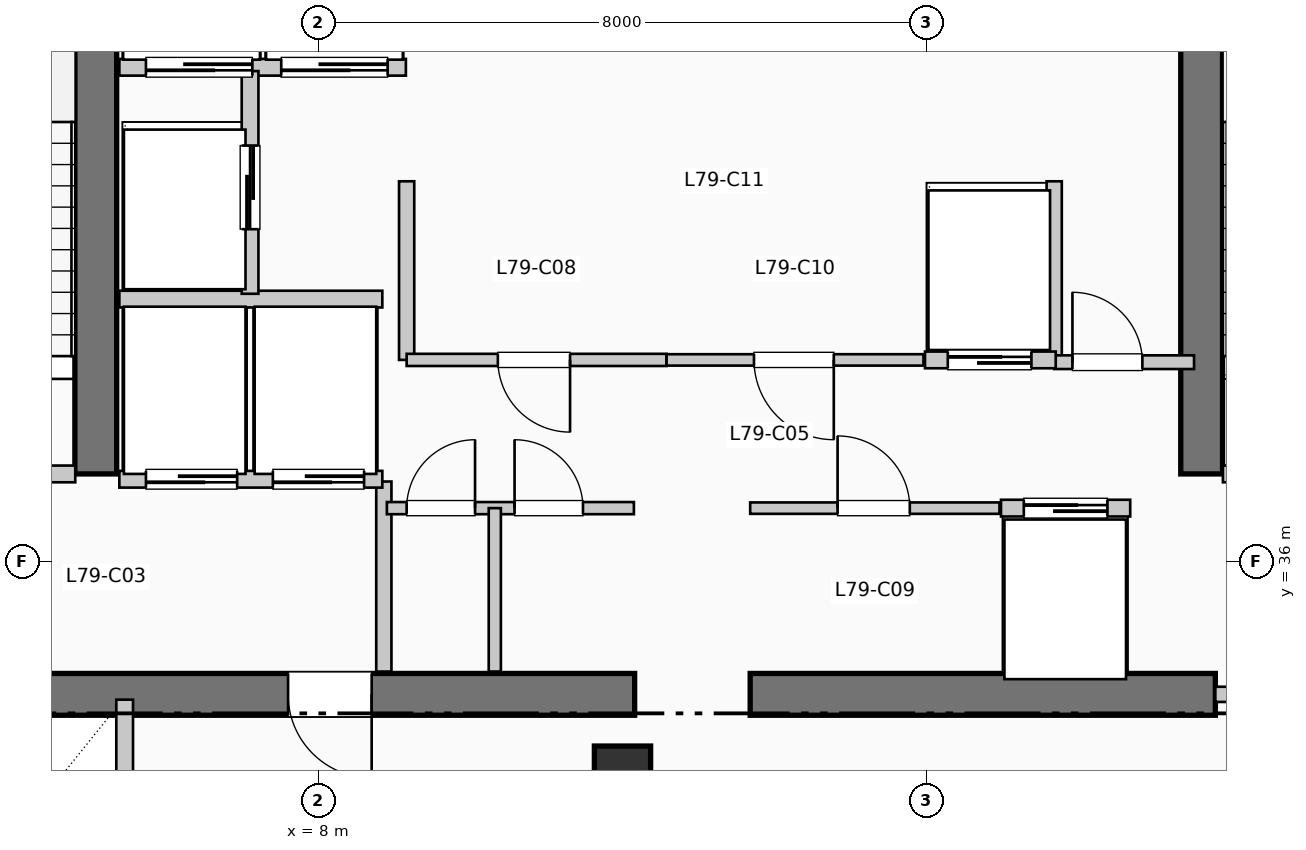
"""IFC4 building model, lengths in metres.
Left out: names, types, materials, properties, quantities, classifications, styles, units other than length and angle.
Written with IfcOpenShell. Run it as: python <this file> out.ifc"""

import sys

from ifc_helpers import new_model, si_unit, direction, frame, frame_2d, origin, origin_2d, place, context, subcontext, project, spatial, rectangle, extrude, element, fill, save


model = new_model("IFC4")
c1 = context("Model", 3, precision=1e-05, world=origin(), true_north=direction((0.0, 1.0)))
c2 = subcontext(c1, "Body", "Model", "MODEL_VIEW")
j1 = project(units=[si_unit("LENGTHUNIT", "METRE"), si_unit("PLANEANGLEUNIT", "RADIAN")], contexts=[c1])
p1 = place(None, origin())
s1 = spatial("IfcSite", under=j1, at=p1, CompositionType="ELEMENT")
p2 = place(p1, origin())
s2 = spatial("IfcBuilding", under=s1, at=p2, CompositionType="ELEMENT")
p3 = place(p2, frame((0.0, 0.0, 323.73)))
s3 = spatial("IfcBuildingStorey", under=s2, at=p3, CompositionType="ELEMENT", Elevation=323.73)
p4 = place(p3, frame((1.45, 34.25, 0.0), z_axis=(0.0, 0.0, 1.0), x_axis=(1.0, 0.0, 0.0)))
e1 = element("IfcWall", 1, at=p4, inside=s3, PredefinedType="SHEAR", context=c2, shape_type="SweptSolid", body=[
    extrude(rectangle(XDim=10.71, YDim=0.55, at=frame_2d((5.355, 0.0))), origin(), (0.0, 0.0, 1.0), 3.96),
])
p5 = place(p4, frame((7.25, 0.0, 0.0), z_axis=(0.0, 0.0, 1.0), x_axis=(-1.0, 0.0, 0.0)))
e2 = element("IfcOpeningElement", 2, at=p5, cuts=e1, PredefinedType="OPENING", context=c2, shape_type="SweptSolid", body=[
    extrude(rectangle(XDim=1.1, YDim=2.15, at=frame_2d((0.55, 1.075))), frame((0.0, 0.285, 0.0), z_axis=(0.0, -1.0, 0.0), x_axis=(1.0, 0.0, 0.0)), (0.0, 0.0, 1.0), 0.57),
])
p6 = place(p3, frame((13.68, 34.25, 0.0), z_axis=(0.0, 0.0, 1.0), x_axis=(1.0, 0.0, 0.0)))
e3 = element("IfcWall", 3, at=p6, inside=s3, PredefinedType="SHEAR", context=c2, shape_type="SweptSolid", body=[
    extrude(rectangle(XDim=6.12, YDim=0.55, at=frame_2d((3.06, 0.0))), origin(), (0.0, 0.0, 1.0), 3.96),
])
for number, where, z_axis, x_axis in (
    (4, (5.07, 37.15, 0.0), (0.0, 0.0, 1.0), (0.0, 1.0, 0.0)),
    (5, (19.62, 37.15, 0.0), (0.0, 0.0, 1.0), (0.0, 1.0, 0.0)),
):
    element("IfcWall", number, at=place(p3, frame(where, z_axis=z_axis, x_axis=x_axis)), inside=s3, PredefinedType="SHEAR", context=c2, shape_type="SweptSolid", body=[
        extrude(rectangle(XDim=7.89, YDim=0.55, at=frame_2d((3.945, 0.0))), origin(), (0.0, 0.0, 1.0), 3.96),
    ])
p7 = place(p3, frame((12.0, 33.2, 0.0), z_axis=(0.0, 0.0, 1.0), x_axis=(1.0, 0.0, 0.0)))
e6 = element("IfcColumn", 6, at=p7, inside=s3, PredefinedType="COLUMN", context=c2, shape_type="SweptSolid", body=[
    extrude(rectangle(XDim=0.74, YDim=0.74, at=origin_2d()), origin(), (0.0, 0.0, 1.0), 3.96),
])
p8 = place(p3, frame((1.65, 37.15, 0.0), z_axis=(0.0, 0.0, 1.0), x_axis=(1.0, 0.0, 0.0)))
e7 = element("IfcWall", 7, at=p8, inside=s3, PredefinedType="PARTITIONING", context=c2, shape_type="SweptSolid", body=[
    extrude(rectangle(XDim=3.15, YDim=0.22, at=frame_2d((1.575, 0.0))), origin(), (0.0, 0.0, 1.0), 3.74),
])
p9 = place(p8, frame((2.05, 0.0, 0.0), z_axis=(0.0, 0.0, 1.0), x_axis=(-1.0, 0.0, 0.0)))
e8 = element("IfcOpeningElement", 8, at=p9, cuts=e7, PredefinedType="OPENING", context=c2, shape_type="SweptSolid", body=[
    extrude(rectangle(XDim=1.05, YDim=2.15, at=frame_2d((0.525, 1.075))), frame((0.0, 0.12, 0.0), z_axis=(0.0, -1.0, 0.0), x_axis=(1.0, 0.0, 0.0)), (0.0, 0.0, 1.0), 0.24),
])
p10 = place(p3, frame((8.86, 34.55, 0.0), z_axis=(0.0, 0.0, 1.0), x_axis=(0.0, 1.0, 0.0)))
e9 = element("IfcWall", 9, at=p10, inside=s3, PredefinedType="PARTITIONING", context=c2, shape_type="SweptSolid", body=[
    extrude(rectangle(XDim=2.5, YDim=0.2, at=frame_2d((1.25, 0.0))), origin(), (0.0, 0.0, 1.0), 3.74),
])
p11 = place(p3, frame((19.9, 37.15, 0.0), z_axis=(0.0, 0.0, 1.0), x_axis=(1.0, 0.0, 0.0)))
e10 = element("IfcWall", 10, at=p11, inside=s3, PredefinedType="PARTITIONING", context=c2, shape_type="SweptSolid", body=[
    extrude(rectangle(XDim=3.15, YDim=0.22, at=frame_2d((1.575, 0.0))), origin(), (0.0, 0.0, 1.0), 3.74),
])
p12 = place(p11, frame((2.05, 0.0, 0.0), z_axis=(0.0, 0.0, 1.0), x_axis=(-1.0, 0.0, 0.0)))
e11 = element("IfcOpeningElement", 11, at=p12, cuts=e10, PredefinedType="OPENING", context=c2, shape_type="SweptSolid", body=[
    extrude(rectangle(XDim=1.05, YDim=2.15, at=frame_2d((0.525, 1.075))), frame((0.0, 0.12, 0.0), z_axis=(0.0, -1.0, 0.0), x_axis=(1.0, 0.0, 0.0)), (0.0, 0.0, 1.0), 0.24),
])
p13 = place(p3, frame((19.8, 34.25, 0.0), z_axis=(0.0, 0.0, 1.0), x_axis=(1.0, 0.0, 0.0)))
e12 = element("IfcWall", 12, at=p13, inside=s3, PredefinedType="PARTITIONING", context=c2, shape_type="SweptSolid", body=[
    extrude(rectangle(XDim=3.25, YDim=0.2, at=frame_2d((1.625, 0.0))), origin(), (0.0, 0.0, 1.0), 3.74),
])
p14 = place(p13, frame((2.15, 0.0, 0.0), z_axis=(0.0, 0.0, 1.0), x_axis=(-1.0, 0.0, 0.0)))
e13 = element("IfcOpeningElement", 13, at=p14, cuts=e12, PredefinedType="OPENING", context=c2, shape_type="SweptSolid", body=[
    extrude(rectangle(XDim=1.1, YDim=2.15, at=frame_2d((0.55, 1.075))), frame((0.0, 0.11, 0.0), z_axis=(0.0, -1.0, 0.0), x_axis=(1.0, 0.0, 0.0)), (0.0, 0.0, 1.0), 0.22),
])
p15 = place(p3, frame((5.38, 37.08, 0.0), z_axis=(0.0, 0.0, 1.0), x_axis=(1.0, 0.0, 0.0)))
e14 = element("IfcWall", 14, at=p15, inside=s3, PredefinedType="PARTITIONING", context=c2, shape_type="SweptSolid", body=[
    extrude(rectangle(XDim=3.46, YDim=0.22, at=frame_2d((1.73, 0.0))), origin(), (0.0, 0.0, 1.0), 3.74),
])
p16 = place(p15, frame((1.55, 0.0, 0.0), z_axis=(0.0, 0.0, 1.0), x_axis=(-1.0, 0.0, 0.0)))
e15 = element("IfcOpeningElement", 15, at=p16, cuts=e14, PredefinedType="OPENING", context=c2, shape_type="SweptSolid", body=[
    extrude(rectangle(XDim=1.2, YDim=2.2, at=frame_2d((0.6, 1.1))), frame((0.0, 0.12, 0.0), z_axis=(0.0, -1.0, 0.0), x_axis=(1.0, 0.0, 0.0)), (0.0, 0.0, 1.0), 0.24),
])
p17 = place(p15, frame((3.22, 0.0, 0.0), z_axis=(0.0, 0.0, 1.0), x_axis=(-1.0, 0.0, 0.0)))
e16 = element("IfcOpeningElement", 16, at=p17, cuts=e14, PredefinedType="OPENING", context=c2, shape_type="SweptSolid", body=[
    extrude(rectangle(XDim=1.2, YDim=2.2, at=frame_2d((0.6, 1.1))), frame((0.0, 0.12, 0.0), z_axis=(0.0, -1.0, 0.0), x_axis=(1.0, 0.0, 0.0)), (0.0, 0.0, 1.0), 0.24),
])
p18 = place(p3, frame((5.38, 39.45, 0.0), z_axis=(0.0, 0.0, 1.0), x_axis=(1.0, 0.0, 0.0)))
e17 = element("IfcWall", 17, at=p18, inside=s3, PredefinedType="PARTITIONING", context=c2, shape_type="SweptSolid", body=[
    extrude(rectangle(XDim=3.46, YDim=0.22, at=frame_2d((1.73, 0.0))), origin(), (0.0, 0.0, 1.0), 3.74),
])
p19 = place(p3, frame((5.38, 42.5, 0.0), z_axis=(0.0, 0.0, 1.0), x_axis=(1.0, 0.0, 0.0)))
e18 = element("IfcWall", 18, at=p19, inside=s3, PredefinedType="PARTITIONING", context=c2, shape_type="SweptSolid", body=[
    extrude(rectangle(XDim=3.77, YDim=0.22, at=frame_2d((1.885, 0.0))), origin(), (0.0, 0.0, 1.0), 3.74),
])
p20 = place(p19, frame((1.75, 0.0, 0.0), z_axis=(0.0, 0.0, 1.0), x_axis=(-1.0, 0.0, 0.0)))
e19 = element("IfcOpeningElement", 19, at=p20, cuts=e18, PredefinedType="OPENING", context=c2, shape_type="SweptSolid", body=[
    extrude(rectangle(XDim=1.4, YDim=2.2, at=frame_2d((0.7, 1.1))), frame((0.0, 0.12, 0.0), z_axis=(0.0, -1.0, 0.0), x_axis=(1.0, 0.0, 0.0)), (0.0, 0.0, 1.0), 0.24),
])
p21 = place(p19, frame((3.53, 0.0, 0.0), z_axis=(0.0, 0.0, 1.0), x_axis=(-1.0, 0.0, 0.0)))
e20 = element("IfcOpeningElement", 20, at=p21, cuts=e18, PredefinedType="OPENING", context=c2, shape_type="SweptSolid", body=[
    extrude(rectangle(XDim=1.4, YDim=2.2, at=frame_2d((0.7, 1.1))), frame((0.0, 0.12, 0.0), z_axis=(0.0, -1.0, 0.0), x_axis=(1.0, 0.0, 0.0)), (0.0, 0.0, 1.0), 0.24),
])
p22 = place(p3, frame((7.1, 39.52, 0.0), z_axis=(0.0, 0.0, 1.0), x_axis=(0.0, 1.0, 0.0)))
e21 = element("IfcWall", 21, at=p22, inside=s3, PredefinedType="PARTITIONING", context=c2, shape_type="SweptSolid", body=[
    extrude(rectangle(XDim=2.93, YDim=0.22, at=frame_2d((1.465, 0.0))), origin(), (0.0, 0.0, 1.0), 3.74),
])
p23 = place(p22, frame((0.85, 0.0, 0.0)))
e22 = element("IfcOpeningElement", 22, at=p23, cuts=e21, PredefinedType="OPENING", context=c2, shape_type="SweptSolid", body=[
    extrude(rectangle(XDim=1.1, YDim=2.2, at=frame_2d((0.55, 1.1))), frame((0.0, 0.12, 0.0), z_axis=(0.0, -1.0, 0.0), x_axis=(1.0, 0.0, 0.0)), (0.0, 0.0, 1.0), 0.24),
])
p24 = place(p3, frame((5.45, 31.8, 0.0), z_axis=(0.0, 0.0, 1.0), x_axis=(0.0, 1.0, 0.0)))
e23 = element("IfcWall", 23, at=p24, inside=s3, PredefinedType="PARTITIONING", context=c2, shape_type="SweptSolid", body=[
    extrude(rectangle(XDim=2.38, YDim=0.22, at=frame_2d((1.19, 0.0))), origin(), (0.0, 0.0, 1.0), 3.74),
])
for number, where, z_axis, x_axis in (
    (24, (9.16, 38.65, 0.0), (0.0, 0.0, 1.0), (0.0, 1.0, 0.0)),
    (25, (17.68, 38.65, 0.0), (0.0, 0.0, 1.0), (0.0, 1.0, 0.0)),
):
    element("IfcWall", number, at=place(p3, frame(where, z_axis=z_axis, x_axis=x_axis)), inside=s3, PredefinedType="PARTITIONING", context=c2, shape_type="SweptSolid", body=[
        extrude(rectangle(XDim=2.35, YDim=0.2, at=frame_2d((1.175, 0.0))), origin(), (0.0, 0.0, 1.0), 3.74),
    ])
p25 = place(p3, frame((17.68, 38.62, 0.0), z_axis=(0.0, 0.0, 1.0), x_axis=(1.0, 0.0, 0.0)))
e26 = element("IfcWall", 26, at=p25, inside=s3, PredefinedType="PARTITIONING", context=c2, shape_type="SweptSolid", body=[
    extrude(rectangle(XDim=1.84, YDim=0.18, at=frame_2d((0.92, 0.0))), origin(), (0.0, 0.0, 1.0), 3.74),
])
p26 = place(p25, frame((0.24, 0.0, 0.0)))
e27 = element("IfcOpeningElement", 27, at=p26, cuts=e26, PredefinedType="OPENING", context=c2, shape_type="SweptSolid", body=[
    extrude(rectangle(XDim=0.92, YDim=2.1, at=frame_2d((0.46, 1.05))), frame((0.0, 0.1, 0.0), z_axis=(0.0, -1.0, 0.0), x_axis=(1.0, 0.0, 0.0)), (0.0, 0.0, 1.0), 0.2),
])
p27 = place(p3, frame((8.9, 36.7, 0.0), z_axis=(0.0, 0.0, 1.0), x_axis=(1.0, 0.0, 0.0)))
e28 = element("IfcWall", 28, at=p27, inside=s3, PredefinedType="PARTITIONING", context=c2, shape_type="SweptSolid", body=[
    extrude(rectangle(XDim=3.25, YDim=0.16, at=frame_2d((1.625, 0.0))), origin(), (0.0, 0.0, 1.0), 3.74),
])
p28 = place(p27, frame((0.26, 0.0, 0.0)))
e29 = element("IfcOpeningElement", 29, at=p28, cuts=e28, PredefinedType="OPENING", context=c2, shape_type="SweptSolid", body=[
    extrude(rectangle(XDim=0.9, YDim=2.15, at=frame_2d((0.45, 1.075))), frame((0.0, 0.09, 0.0), z_axis=(0.0, -1.0, 0.0), x_axis=(1.0, 0.0, 0.0)), (0.0, 0.0, 1.0), 0.18),
])
p29 = place(p27, frame((1.68, 0.0, 0.0)))
e30 = element("IfcOpeningElement", 30, at=p29, cuts=e28, PredefinedType="OPENING", context=c2, shape_type="SweptSolid", body=[
    extrude(rectangle(XDim=0.9, YDim=2.15, at=frame_2d((0.45, 1.075))), frame((0.0, 0.09, 0.0), z_axis=(0.0, -1.0, 0.0), x_axis=(1.0, 0.0, 0.0)), (0.0, 0.0, 1.0), 0.18),
])
p30 = place(p3, frame((10.32, 34.55, 0.0), z_axis=(0.0, 0.0, 1.0), x_axis=(0.0, 1.0, 0.0)))
e31 = element("IfcWall", 31, at=p30, inside=s3, PredefinedType="PARTITIONING", context=c2, shape_type="SweptSolid", body=[
    extrude(rectangle(XDim=2.15, YDim=0.16, at=frame_2d((1.075, 0.0))), origin(), (0.0, 0.0, 1.0), 3.74),
])
p31 = place(p3, frame((9.16, 38.65, 0.0), z_axis=(0.0, 0.0, 1.0), x_axis=(1.0, 0.0, 0.0)))
e32 = element("IfcWall", 32, at=p31, inside=s3, PredefinedType="PARTITIONING", context=c2, shape_type="SweptSolid", body=[
    extrude(rectangle(XDim=3.42, YDim=0.16, at=frame_2d((1.71, 0.0))), origin(), (0.0, 0.0, 1.0), 3.74),
])
p32 = place(p31, frame((2.15, 0.0, 0.0), z_axis=(0.0, 0.0, 1.0), x_axis=(-1.0, 0.0, 0.0)))
e33 = element("IfcOpeningElement", 33, at=p32, cuts=e32, PredefinedType="OPENING", context=c2, shape_type="SweptSolid", body=[
    extrude(rectangle(XDim=0.95, YDim=2.15, at=frame_2d((0.475, 1.075))), frame((0.0, 0.09, 0.0), z_axis=(0.0, -1.0, 0.0), x_axis=(1.0, 0.0, 0.0)), (0.0, 0.0, 1.0), 0.18),
])
p33 = place(p3, frame((13.68, 36.7, 0.0), z_axis=(0.0, 0.0, 1.0), x_axis=(1.0, 0.0, 0.0)))
e34 = element("IfcWall", 34, at=p33, inside=s3, PredefinedType="PARTITIONING", context=c2, shape_type="SweptSolid", body=[
    extrude(rectangle(XDim=3.28, YDim=0.15, at=frame_2d((1.64, 0.0))), origin(), (0.0, 0.0, 1.0), 3.74),
])
p34 = place(p33, frame((1.15, 0.0, 0.0)))
e35 = element("IfcOpeningElement", 35, at=p34, cuts=e34, PredefinedType="OPENING", context=c2, shape_type="SweptSolid", body=[
    extrude(rectangle(XDim=0.95, YDim=2.15, at=frame_2d((0.475, 1.075))), frame((0.0, 0.085, 0.0), z_axis=(0.0, -1.0, 0.0), x_axis=(1.0, 0.0, 0.0)), (0.0, 0.0, 1.0), 0.17),
])
p35 = place(p3, frame((12.58, 38.65, 0.0), z_axis=(0.0, 0.0, 1.0), x_axis=(1.0, 0.0, 0.0)))
e36 = element("IfcWall", 36, at=p35, inside=s3, PredefinedType="PARTITIONING", context=c2, shape_type="SweptSolid", body=[
    extrude(rectangle(XDim=3.38, YDim=0.15, at=frame_2d((1.69, 0.0))), origin(), (0.0, 0.0, 1.0), 3.74),
])
p36 = place(p35, frame((2.2, 0.0, 0.0), z_axis=(0.0, 0.0, 1.0), x_axis=(-1.0, 0.0, 0.0)))
e37 = element("IfcOpeningElement", 37, at=p36, cuts=e36, PredefinedType="OPENING", context=c2, shape_type="SweptSolid", body=[
    extrude(rectangle(XDim=1.05, YDim=2.15, at=frame_2d((0.525, 1.075))), frame((0.0, 0.085, 0.0), z_axis=(0.0, -1.0, 0.0), x_axis=(1.0, 0.0, 0.0)), (0.0, 0.0, 1.0), 0.17),
])
p37 = place(p3, frame((16.98, 36.7, 0.0), z_axis=(0.0, 0.0, 1.0), x_axis=(1.0, 0.0, 0.0)))
e38 = element("IfcWall", 38, at=p37, inside=s3, PredefinedType="PARTITIONING", context=c2, shape_type="SweptSolid", body=[
    extrude(rectangle(XDim=1.7, YDim=0.22, at=frame_2d((0.85, 0.0))), origin(), (0.0, 0.0, 1.0), 3.74),
])
p38 = place(p37, frame((0.3, 0.0, 0.0)))
e39 = element("IfcOpeningElement", 39, at=p38, cuts=e38, PredefinedType="OPENING", context=c2, shape_type="SweptSolid", body=[
    extrude(rectangle(XDim=1.1, YDim=2.2, at=frame_2d((0.55, 1.1))), frame((0.0, 0.12, 0.0), z_axis=(0.0, -1.0, 0.0), x_axis=(1.0, 0.0, 0.0)), (0.0, 0.0, 1.0), 0.24),
])
p39 = place(p3, frame((15.98, 38.65, 0.0), z_axis=(0.0, 0.0, 1.0), x_axis=(1.0, 0.0, 0.0)))
e40 = element("IfcWall", 40, at=p39, inside=s3, PredefinedType="PARTITIONING", context=c2, shape_type="SweptSolid", body=[
    extrude(rectangle(XDim=1.72, YDim=0.22, at=frame_2d((0.86, 0.0))), origin(), (0.0, 0.0, 1.0), 3.74),
])
p40 = place(p39, frame((0.3, 0.0, 0.0)))
e41 = element("IfcOpeningElement", 41, at=p40, cuts=e40, PredefinedType="OPENING", context=c2, shape_type="SweptSolid", body=[
    extrude(rectangle(XDim=1.1, YDim=2.2, at=frame_2d((0.55, 1.1))), frame((0.0, 0.12, 0.0), z_axis=(0.0, -1.0, 0.0), x_axis=(1.0, 0.0, 0.0)), (0.0, 0.0, 1.0), 0.24),
])
p41 = place(p5, origin())
e42 = element("IfcDoor", 42, at=p41, inside=s3, OperationType="SINGLE_SWING_RIGHT", PredefinedType="DOOR", context=c2, shape_type="SweptSolid", body=[
    extrude(rectangle(XDim=1.1, YDim=2.15, at=frame_2d((0.55, 1.075))), frame((0.0, 0.025, 0.0), z_axis=(0.0, -1.0, 0.0), x_axis=(1.0, 0.0, 0.0)), (0.0, 0.0, 1.0), 0.05),
])
fill(e2, e42)
p42 = place(p16, origin())
e43 = element("IfcDoor", 43, at=p42, inside=s3, OperationType="SLIDING_TO_RIGHT", PredefinedType="DOOR", context=c2, shape_type="SweptSolid", body=[
    extrude(rectangle(XDim=1.2, YDim=2.2, at=frame_2d((0.6, 1.1))), frame((0.0, 0.025, 0.0), z_axis=(0.0, -1.0, 0.0), x_axis=(1.0, 0.0, 0.0)), (0.0, 0.0, 1.0), 0.05),
])
fill(e15, e43)
p43 = place(p17, origin())
e44 = element("IfcDoor", 44, at=p43, inside=s3, OperationType="SLIDING_TO_RIGHT", PredefinedType="DOOR", context=c2, shape_type="SweptSolid", body=[
    extrude(rectangle(XDim=1.2, YDim=2.2, at=frame_2d((0.6, 1.1))), frame((0.0, 0.025, 0.0), z_axis=(0.0, -1.0, 0.0), x_axis=(1.0, 0.0, 0.0)), (0.0, 0.0, 1.0), 0.05),
])
fill(e16, e44)
p44 = place(p20, origin())
e45 = element("IfcDoor", 45, at=p44, inside=s3, OperationType="SLIDING_TO_LEFT", PredefinedType="DOOR", context=c2, shape_type="SweptSolid", body=[
    extrude(rectangle(XDim=1.4, YDim=2.2, at=frame_2d((0.7, 1.1))), frame((0.0, 0.025, 0.0), z_axis=(0.0, -1.0, 0.0), x_axis=(1.0, 0.0, 0.0)), (0.0, 0.0, 1.0), 0.05),
])
fill(e19, e45)
p45 = place(p21, origin())
e46 = element("IfcDoor", 46, at=p45, inside=s3, OperationType="SLIDING_TO_LEFT", PredefinedType="DOOR", context=c2, shape_type="SweptSolid", body=[
    extrude(rectangle(XDim=1.4, YDim=2.2, at=frame_2d((0.7, 1.1))), frame((0.0, 0.025, 0.0), z_axis=(0.0, -1.0, 0.0), x_axis=(1.0, 0.0, 0.0)), (0.0, 0.0, 1.0), 0.05),
])
fill(e20, e46)
p46 = place(p23, origin())
e47 = element("IfcDoor", 47, at=p46, inside=s3, OperationType="SLIDING_TO_LEFT", PredefinedType="DOOR", context=c2, shape_type="SweptSolid", body=[
    extrude(rectangle(XDim=1.1, YDim=2.2, at=frame_2d((0.55, 1.1))), frame((0.0, 0.025, 0.0), z_axis=(0.0, -1.0, 0.0), x_axis=(1.0, 0.0, 0.0)), (0.0, 0.0, 1.0), 0.05),
])
fill(e22, e47)
p47 = place(p26, origin())
e48 = element("IfcDoor", 48, at=p47, inside=s3, OperationType="SINGLE_SWING_LEFT", PredefinedType="DOOR", context=c2, shape_type="SweptSolid", body=[
    extrude(rectangle(XDim=0.92, YDim=2.1, at=frame_2d((0.46, 1.05))), frame((0.0, 0.025, 0.0), z_axis=(0.0, -1.0, 0.0), x_axis=(1.0, 0.0, 0.0)), (0.0, 0.0, 1.0), 0.05),
])
fill(e27, e48)
p48 = place(p28, origin())
e49 = element("IfcDoor", 49, at=p48, inside=s3, OperationType="SINGLE_SWING_RIGHT", PredefinedType="DOOR", context=c2, shape_type="SweptSolid", body=[
    extrude(rectangle(XDim=0.9, YDim=2.15, at=frame_2d((0.45, 1.075))), frame((0.0, 0.025, 0.0), z_axis=(0.0, -1.0, 0.0), x_axis=(1.0, 0.0, 0.0)), (0.0, 0.0, 1.0), 0.05),
])
fill(e29, e49)
p49 = place(p29, origin())
e50 = element("IfcDoor", 50, at=p49, inside=s3, OperationType="SINGLE_SWING_LEFT", PredefinedType="DOOR", context=c2, shape_type="SweptSolid", body=[
    extrude(rectangle(XDim=0.9, YDim=2.15, at=frame_2d((0.45, 1.075))), frame((0.0, 0.025, 0.0), z_axis=(0.0, -1.0, 0.0), x_axis=(1.0, 0.0, 0.0)), (0.0, 0.0, 1.0), 0.05),
])
fill(e30, e50)
p50 = place(p32, origin())
e51 = element("IfcDoor", 51, at=p50, inside=s3, OperationType="SINGLE_SWING_RIGHT", PredefinedType="DOOR", context=c2, shape_type="SweptSolid", body=[
    extrude(rectangle(XDim=0.95, YDim=2.15, at=frame_2d((0.475, 1.075))), frame((0.0, 0.025, 0.0), z_axis=(0.0, -1.0, 0.0), x_axis=(1.0, 0.0, 0.0)), (0.0, 0.0, 1.0), 0.05),
])
fill(e33, e51)
p51 = place(p34, origin())
e52 = element("IfcDoor", 52, at=p51, inside=s3, OperationType="SINGLE_SWING_LEFT", PredefinedType="DOOR", context=c2, shape_type="SweptSolid", body=[
    extrude(rectangle(XDim=0.95, YDim=2.15, at=frame_2d((0.475, 1.075))), frame((0.0, 0.025, 0.0), z_axis=(0.0, -1.0, 0.0), x_axis=(1.0, 0.0, 0.0)), (0.0, 0.0, 1.0), 0.05),
])
fill(e35, e52)
p52 = place(p36, origin())
e53 = element("IfcDoor", 53, at=p52, inside=s3, OperationType="SINGLE_SWING_RIGHT", PredefinedType="DOOR", context=c2, shape_type="SweptSolid", body=[
    extrude(rectangle(XDim=1.05, YDim=2.15, at=frame_2d((0.525, 1.075))), frame((0.0, 0.025, 0.0), z_axis=(0.0, -1.0, 0.0), x_axis=(1.0, 0.0, 0.0)), (0.0, 0.0, 1.0), 0.05),
])
fill(e37, e53)
p53 = place(p38, origin())
e54 = element("IfcDoor", 54, at=p53, inside=s3, OperationType="SLIDING_TO_LEFT", PredefinedType="DOOR", context=c2, shape_type="SweptSolid", body=[
    extrude(rectangle(XDim=1.1, YDim=2.2, at=frame_2d((0.55, 1.1))), frame((0.0, 0.025, 0.0), z_axis=(0.0, -1.0, 0.0), x_axis=(1.0, 0.0, 0.0)), (0.0, 0.0, 1.0), 0.05),
])
fill(e39, e54)
p54 = place(p40, origin())
e55 = element("IfcDoor", 55, at=p54, inside=s3, OperationType="SLIDING_TO_LEFT", PredefinedType="DOOR", context=c2, shape_type="SweptSolid", body=[
    extrude(rectangle(XDim=1.1, YDim=2.2, at=frame_2d((0.55, 1.1))), frame((0.0, 0.025, 0.0), z_axis=(0.0, -1.0, 0.0), x_axis=(1.0, 0.0, 0.0)), (0.0, 0.0, 1.0), 0.05),
])
fill(e41, e55)
save(model, sys.argv[1])
